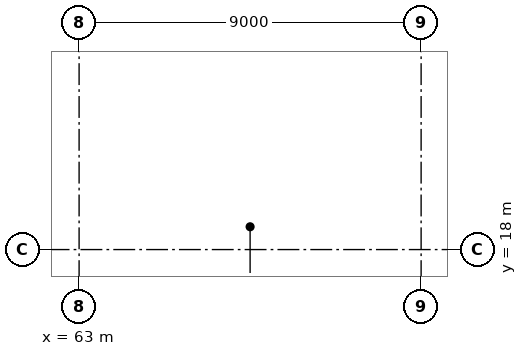
"""IFC4 building model, lengths in metres.
Left out: names, types, materials, properties, quantities, classifications, styles, units other than length and angle.
Written with IfcOpenShell. Run it as: python <this file> out.ifc"""

import sys

from ifc_helpers import new_model, si_unit, direction, frame, frame_2d, origin, place, context, subcontext, project, spatial, rectangle, extrude, element, fill, save


model = new_model("IFC4")
c1 = context("Model", 3, precision=1e-05, world=origin(), true_north=direction((0.0, 1.0)))
c2 = subcontext(c1, "Body", "Model", "MODEL_VIEW")
j1 = project(units=[si_unit("LENGTHUNIT", "METRE"), si_unit("PLANEANGLEUNIT", "RADIAN")], contexts=[c1])
p1 = place(None, origin())
s1 = spatial("IfcSite", under=j1, at=p1, CompositionType="ELEMENT")
p2 = place(p1, origin())
s2 = spatial("IfcBuilding", under=s1, at=p2, CompositionType="ELEMENT")
p3 = place(p2, frame((0.0, 0.0, 13.4)))
s3 = spatial("IfcBuildingStorey", under=s2, at=p3, CompositionType="ELEMENT", Elevation=13.4)
p4 = place(p3, frame((54.0, 18.09, 0.0), z_axis=(0.0, 0.0, 1.0), x_axis=(1.0, 0.0, 0.0)))
e1 = element("IfcWall", 1, at=p4, inside=s3, PredefinedType="SOLIDWALL", context=c2, shape_type="SweptSolid", body=[
    extrude(rectangle(XDim=9.0, YDim=0.3, at=frame_2d((4.5, 0.0))), origin(), (0.0, 0.0, 1.0), 7.678),
])
p5 = place(p4, frame((1.65, 0.0, 1.2)))
e2 = element("IfcOpeningElement", 2, at=p5, cuts=e1, PredefinedType="OPENING", context=c2, shape_type="SweptSolid", body=[
    extrude(rectangle(XDim=1.2, YDim=4.8, at=frame_2d((0.6, 2.4))), frame((0.0, 0.16, 0.0), z_axis=(0.0, -1.0, 0.0), x_axis=(1.0, 0.0, 0.0)), (0.0, 0.0, 1.0), 0.32),
])
p6 = place(p4, frame((6.15, 0.0, 1.2)))
e3 = element("IfcOpeningElement", 3, at=p6, cuts=e1, PredefinedType="OPENING", context=c2, shape_type="SweptSolid", body=[
    extrude(rectangle(XDim=1.2, YDim=4.8, at=frame_2d((0.6, 2.4))), frame((0.0, 0.16, 0.0), z_axis=(0.0, -1.0, 0.0), x_axis=(1.0, 0.0, 0.0)), (0.0, 0.0, 1.0), 0.32),
])
p7 = place(p3, frame((72.1, 9.0, 0.0), z_axis=(0.0, 0.0, 1.0), x_axis=(0.0, 1.0, 0.0)))
e4 = element("IfcWall", 4, at=p7, inside=s3, PredefinedType="SOLIDWALL", context=c2, shape_type="SweptSolid", body=[
    extrude(rectangle(XDim=9.0, YDim=0.32, at=frame_2d((4.5, 0.0))), origin(), (0.0, 0.0, 1.0), 7.635),
])
p8 = place(p3, frame((63.0, 18.15, 0.0), z_axis=(0.0, 0.0, 1.0), x_axis=(1.0, 0.0, 0.0)))
e5 = element("IfcWall", 5, at=p8, inside=s3, PredefinedType="SOLIDWALL", context=c2, shape_type="SweptSolid", body=[
    extrude(rectangle(XDim=9.0, YDim=0.3, at=frame_2d((4.5, 0.0))), origin(), (0.0, 0.0, 1.0), 7.428),
])
p9 = place(p3, frame((71.85, 18.3, 0.0), z_axis=(0.0, 0.0, 1.0), x_axis=(0.0, 1.0, 0.0)))
e6 = element("IfcWall", 6, at=p9, inside=s3, PredefinedType="SOLIDWALL", context=c2, shape_type="SweptSolid", body=[
    extrude(rectangle(XDim=3.9, YDim=0.3, at=frame_2d((1.95, 0.0))), origin(), (0.0, 0.0, 1.0), 7.428),
])
p10 = place(p3, frame((63.0, 22.35, 0.0), z_axis=(0.0, 0.0, 1.0), x_axis=(1.0, 0.0, 0.0)))
e7 = element("IfcWall", 7, at=p10, inside=s3, PredefinedType="SOLIDWALL", context=c2, shape_type="SweptSolid", body=[
    extrude(rectangle(XDim=9.0, YDim=0.3, at=frame_2d((4.5, 0.0))), origin(), (0.0, 0.0, 1.0), 7.428),
])
p11 = place(p10, frame((1.15, 0.0, 0.0)))
e8 = element("IfcOpeningElement", 8, at=p11, cuts=e7, PredefinedType="OPENING", context=c2, shape_type="SweptSolid", body=[
    extrude(rectangle(XDim=1.8, YDim=2.1, at=frame_2d((0.9, 1.05))), frame((0.0, 0.16, 0.0), z_axis=(0.0, -1.0, 0.0), x_axis=(1.0, 0.0, 0.0)), (0.0, 0.0, 1.0), 0.32),
])
p12 = place(p3, frame((63.15, 18.3, 0.0), z_axis=(0.0, 0.0, 1.0), x_axis=(0.0, 1.0, 0.0)))
e9 = element("IfcWall", 9, at=p12, inside=s3, PredefinedType="SOLIDWALL", context=c2, shape_type="SweptSolid", body=[
    extrude(rectangle(XDim=3.9, YDim=0.3, at=frame_2d((1.95, 0.0))), origin(), (0.0, 0.0, 1.0), 7.428),
])
p13 = place(p3, frame((72.175, 22.5, 0.0), z_axis=(0.0, 0.0, 1.0), x_axis=(0.0, 1.0, 0.0)))
e10 = element("IfcWall", 10, at=p13, inside=s3, PredefinedType="PARTITIONING", context=c2, shape_type="SweptSolid", body=[
    extrude(rectangle(XDim=4.5, YDim=0.15, at=frame_2d((2.25, 0.0))), origin(), (0.0, 0.0, 1.0), 7.635),
])
p14 = place(p2, frame((0.0, 0.0, 21.2)))
p15 = place(p14, frame((53.7, 18.139, -0.146), z_axis=(0.0, 0.0, 1.0), x_axis=(1.0, 0.0, 0.0)))
p16 = place(p15, frame((5.25, 0.0, 0.15)))
p17 = place(p16, origin())
e11 = element("IfcWindow", 11, at=p17, inside=s3, PartitioningType="SINGLE_PANEL", PredefinedType="SKYLIGHT", context=c2, shape_type="SweptSolid", body=[
    extrude(rectangle(XDim=3.6, YDim=1.0, at=frame_2d((1.8, 0.5))), frame((0.0, 0.03, 0.0), z_axis=(0.0, -1.0, 0.0), x_axis=(1.0, 0.0, 0.0)), (0.0, 0.0, 1.0), 0.06),
])
p18 = place(p14, frame((62.85, 18.139, -0.122), z_axis=(0.0, 0.0, 1.0), x_axis=(1.0, 0.0, 0.0)))
p19 = place(p18, frame((0.6, 0.0, 0.15)))
p20 = place(p19, origin())
e12 = element("IfcWindow", 12, at=p20, inside=s3, PartitioningType="SINGLE_PANEL", PredefinedType="SKYLIGHT", context=c2, shape_type="SweptSolid", body=[
    extrude(rectangle(XDim=3.6, YDim=1.0, at=frame_2d((1.8, 0.5))), frame((0.0, 0.03, 0.0), z_axis=(0.0, -1.0, 0.0), x_axis=(1.0, 0.0, 0.0)), (0.0, 0.0, 1.0), 0.06),
])
p21 = place(p18, frame((5.1, 0.0, 0.15)))
p22 = place(p21, origin())
e13 = element("IfcWindow", 13, at=p22, inside=s3, PartitioningType="SINGLE_PANEL", PredefinedType="SKYLIGHT", context=c2, shape_type="SweptSolid", body=[
    extrude(rectangle(XDim=3.6, YDim=1.0, at=frame_2d((1.8, 0.5))), frame((0.0, 0.03, 0.0), z_axis=(0.0, -1.0, 0.0), x_axis=(1.0, 0.0, 0.0)), (0.0, 0.0, 1.0), 0.06),
])
p23 = place(p11, frame((1.8, 0.0, 0.0), z_axis=(0.0, 0.0, 1.0), x_axis=(-1.0, 0.0, 0.0)))
e14 = element("IfcDoor", 14, at=p23, inside=s3, OperationType="DOUBLE_DOOR_SINGLE_SWING", PredefinedType="DOOR", context=c2, shape_type="SweptSolid", body=[
    extrude(rectangle(XDim=1.8, YDim=2.1, at=frame_2d((0.9, 1.05))), frame((0.0, 0.025, 0.0), z_axis=(0.0, -1.0, 0.0), x_axis=(1.0, 0.0, 0.0)), (0.0, 0.0, 1.0), 0.05),
])
fill(e8, e14)
save(model, sys.argv[1])
